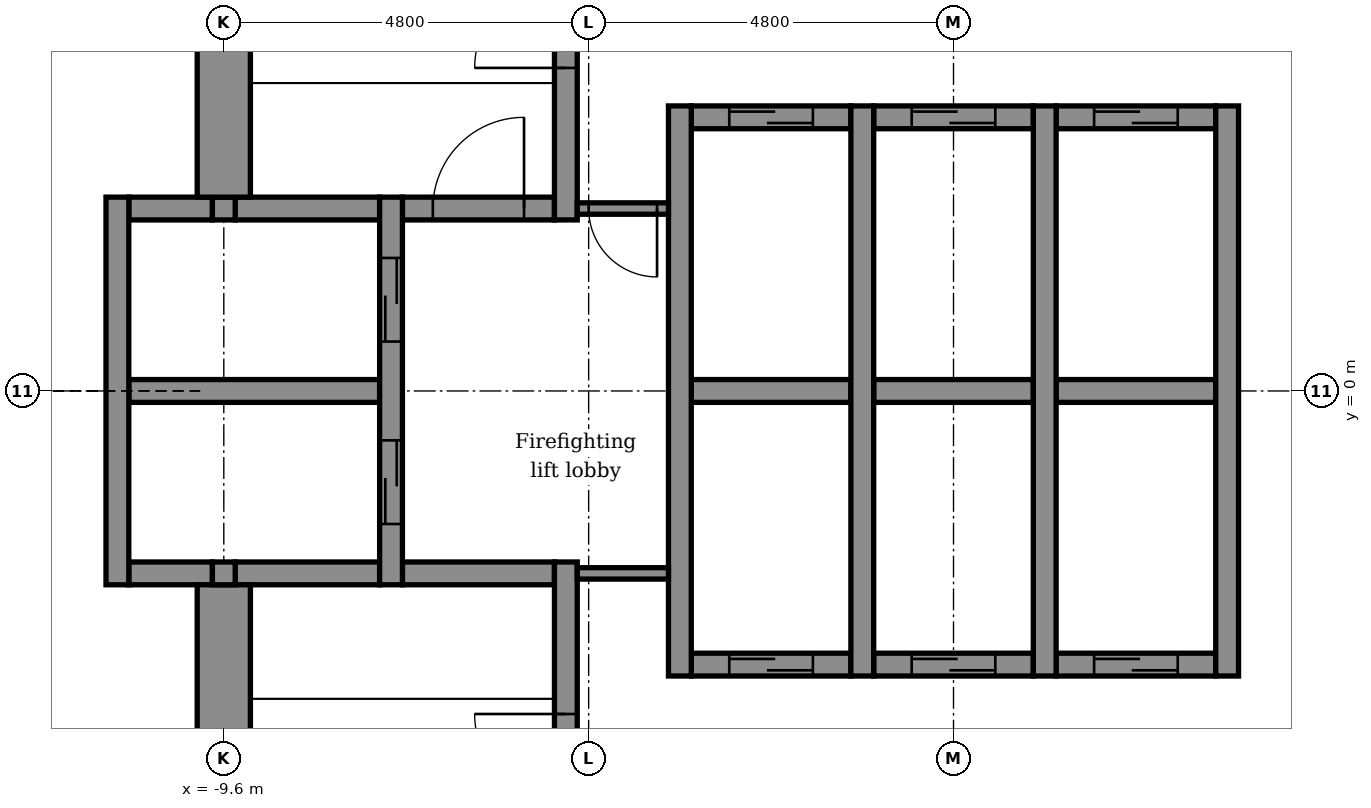
"""IFC4 building model, lengths in metres.
Left out: names, types, materials, properties, quantities, classifications, styles, units other than length and angle.
Written with IfcOpenShell. Run it as: python <this file> out.ifc"""

import sys

from ifc_helpers import new_model, si_unit, direction, frame, frame_2d, origin, place, context, subcontext, project, spatial, rectangle, extrude, element, fill, save


model = new_model("IFC4")
c1 = context("Model", 3, precision=1e-05, world=origin(), true_north=direction((0.0, 1.0)))
c2 = subcontext(c1, "Body", "Model", "MODEL_VIEW")
j1 = project(units=[si_unit("LENGTHUNIT", "METRE"), si_unit("PLANEANGLEUNIT", "RADIAN")], contexts=[c1])
p1 = place(None, origin())
s1 = spatial("IfcSite", under=j1, at=p1, CompositionType="ELEMENT")
p2 = place(p1, origin())
s2 = spatial("IfcBuilding", under=s1, at=p2, CompositionType="ELEMENT")
p3 = place(p2, frame((0.0, 0.0, 201.2)))
s3 = spatial("IfcBuildingStorey", under=s2, at=p3, CompositionType="ELEMENT", Elevation=201.2)
p4 = place(p3, frame((-3.45, -3.6, -0.15), z_axis=(0.0, 0.0, 1.0), x_axis=(1.0, 0.0, 0.0)))
e1 = element("IfcWall", 1, at=p4, inside=s3, PredefinedType="STANDARD", context=c2, shape_type="SweptSolid", body=[
    extrude(rectangle(XDim=2.1, YDim=0.3, at=frame_2d((1.05, 0.0))), origin(), (0.0, 0.0, 1.0), 3.9),
])
p5 = place(p4, frame((0.5, 0.0, 0.15)))
e2 = element("IfcOpeningElement", 2, at=p5, cuts=e1, PredefinedType="OPENING", context=c2, shape_type="SweptSolid", body=[
    extrude(rectangle(XDim=1.1, YDim=2.1, at=frame_2d((0.55, 1.05))), frame((0.0, 0.16, 0.0), z_axis=(0.0, -1.0, 0.0), x_axis=(1.0, 0.0, 0.0)), (0.0, 0.0, 1.0), 0.32),
])
p6 = place(p3, frame((-1.05, -3.6, -0.15), z_axis=(0.0, 0.0, 1.0), x_axis=(1.0, 0.0, 0.0)))
e3 = element("IfcWall", 3, at=p6, inside=s3, PredefinedType="STANDARD", context=c2, shape_type="SweptSolid", body=[
    extrude(rectangle(XDim=2.1, YDim=0.3, at=frame_2d((1.05, 0.0))), origin(), (0.0, 0.0, 1.0), 3.9),
])
p7 = place(p6, frame((0.5, 0.0, 0.15)))
e4 = element("IfcOpeningElement", 4, at=p7, cuts=e3, PredefinedType="OPENING", context=c2, shape_type="SweptSolid", body=[
    extrude(rectangle(XDim=1.1, YDim=2.1, at=frame_2d((0.55, 1.05))), frame((0.0, 0.16, 0.0), z_axis=(0.0, -1.0, 0.0), x_axis=(1.0, 0.0, 0.0)), (0.0, 0.0, 1.0), 0.32),
])
p8 = place(p3, frame((1.35, -3.6, -0.15), z_axis=(0.0, 0.0, 1.0), x_axis=(1.0, 0.0, 0.0)))
e5 = element("IfcWall", 5, at=p8, inside=s3, PredefinedType="STANDARD", context=c2, shape_type="SweptSolid", body=[
    extrude(rectangle(XDim=2.1, YDim=0.3, at=frame_2d((1.05, 0.0))), origin(), (0.0, 0.0, 1.0), 3.9),
])
p9 = place(p8, frame((0.5, 0.0, 0.15)))
e6 = element("IfcOpeningElement", 6, at=p9, cuts=e5, PredefinedType="OPENING", context=c2, shape_type="SweptSolid", body=[
    extrude(rectangle(XDim=1.1, YDim=2.1, at=frame_2d((0.55, 1.05))), frame((0.0, 0.16, 0.0), z_axis=(0.0, -1.0, 0.0), x_axis=(1.0, 0.0, 0.0)), (0.0, 0.0, 1.0), 0.32),
])
p10 = place(p3, frame((-10.85, -2.4, -0.15), z_axis=(0.0, 0.0, 1.0), x_axis=(1.0, 0.0, 0.0)))
e7 = element("IfcWall", 7, at=p10, inside=s3, PredefinedType="STANDARD", context=c2, shape_type="SweptSolid", body=[
    extrude(rectangle(XDim=1.1, YDim=0.3, at=frame_2d((0.55, 0.0))), origin(), (0.0, 0.0, 1.0), 3.9),
])
p11 = place(p3, frame((-9.45, -2.4, -0.15), z_axis=(0.0, 0.0, 1.0), x_axis=(1.0, 0.0, 0.0)))
e8 = element("IfcWall", 8, at=p11, inside=s3, PredefinedType="STANDARD", context=c2, shape_type="SweptSolid", body=[
    extrude(rectangle(XDim=1.9, YDim=0.3, at=frame_2d((0.95, 0.0))), origin(), (0.0, 0.0, 1.0), 3.9),
])
p12 = place(p3, frame((-7.25, -2.4, -0.15), z_axis=(0.0, 0.0, 1.0), x_axis=(1.0, 0.0, 0.0)))
e9 = element("IfcWall", 9, at=p12, inside=s3, PredefinedType="STANDARD", context=c2, shape_type="SweptSolid", body=[
    extrude(rectangle(XDim=2.0, YDim=0.3, at=frame_2d((1.0, 0.0))), origin(), (0.0, 0.0, 1.0), 3.9),
])
p13 = place(p3, frame((-10.85, 0.0, -0.15), z_axis=(0.0, 0.0, 1.0), x_axis=(1.0, 0.0, 0.0)))
e10 = element("IfcWall", 10, at=p13, inside=s3, PredefinedType="STANDARD", context=c2, shape_type="SweptSolid", body=[
    extrude(rectangle(XDim=3.3, YDim=0.3, at=frame_2d((1.65, 0.0))), origin(), (0.0, 0.0, 1.0), 3.9),
])
p14 = place(p3, frame((-3.45, 0.0, -0.15), z_axis=(0.0, 0.0, 1.0), x_axis=(1.0, 0.0, 0.0)))
e11 = element("IfcWall", 11, at=p14, inside=s3, PredefinedType="STANDARD", context=c2, shape_type="SweptSolid", body=[
    extrude(rectangle(XDim=2.1, YDim=0.3, at=frame_2d((1.05, 0.0))), origin(), (0.0, 0.0, 1.0), 3.9),
])
p15 = place(p3, frame((-1.05, 0.0, -0.15), z_axis=(0.0, 0.0, 1.0), x_axis=(1.0, 0.0, 0.0)))
e12 = element("IfcWall", 12, at=p15, inside=s3, PredefinedType="STANDARD", context=c2, shape_type="SweptSolid", body=[
    extrude(rectangle(XDim=2.1, YDim=0.3, at=frame_2d((1.05, 0.0))), origin(), (0.0, 0.0, 1.0), 3.9),
])
p16 = place(p3, frame((1.35, 0.0, -0.15), z_axis=(0.0, 0.0, 1.0), x_axis=(1.0, 0.0, 0.0)))
e13 = element("IfcWall", 13, at=p16, inside=s3, PredefinedType="STANDARD", context=c2, shape_type="SweptSolid", body=[
    extrude(rectangle(XDim=2.1, YDim=0.3, at=frame_2d((1.05, 0.0))), origin(), (0.0, 0.0, 1.0), 3.9),
])
p17 = place(p3, frame((-10.85, 2.4, -0.15), z_axis=(0.0, 0.0, 1.0), x_axis=(1.0, 0.0, 0.0)))
e14 = element("IfcWall", 14, at=p17, inside=s3, PredefinedType="STANDARD", context=c2, shape_type="SweptSolid", body=[
    extrude(rectangle(XDim=1.1, YDim=0.3, at=frame_2d((0.55, 0.0))), origin(), (0.0, 0.0, 1.0), 3.9),
])
p18 = place(p3, frame((-9.45, 2.4, -0.15), z_axis=(0.0, 0.0, 1.0), x_axis=(1.0, 0.0, 0.0)))
e15 = element("IfcWall", 15, at=p18, inside=s3, PredefinedType="STANDARD", context=c2, shape_type="SweptSolid", body=[
    extrude(rectangle(XDim=1.9, YDim=0.3, at=frame_2d((0.95, 0.0))), origin(), (0.0, 0.0, 1.0), 3.9),
])
p19 = place(p3, frame((-7.25, 2.4, -0.15), z_axis=(0.0, 0.0, 1.0), x_axis=(1.0, 0.0, 0.0)))
e16 = element("IfcWall", 16, at=p19, inside=s3, PredefinedType="STANDARD", context=c2, shape_type="SweptSolid", body=[
    extrude(rectangle(XDim=2.0, YDim=0.3, at=frame_2d((1.0, 0.0))), origin(), (0.0, 0.0, 1.0), 3.9),
])
p20 = place(p19, frame((0.4, 0.0, 0.15)))
e17 = element("IfcOpeningElement", 17, at=p20, cuts=e16, PredefinedType="OPENING", context=c2, shape_type="SweptSolid", body=[
    extrude(rectangle(XDim=1.2, YDim=2.1, at=frame_2d((0.6, 1.05))), frame((0.0, 0.16, 0.0), z_axis=(0.0, -1.0, 0.0), x_axis=(1.0, 0.0, 0.0)), (0.0, 0.0, 1.0), 0.32),
])
p21 = place(p3, frame((-3.45, 3.6, -0.15), z_axis=(0.0, 0.0, 1.0), x_axis=(1.0, 0.0, 0.0)))
e18 = element("IfcWall", 18, at=p21, inside=s3, PredefinedType="STANDARD", context=c2, shape_type="SweptSolid", body=[
    extrude(rectangle(XDim=2.1, YDim=0.3, at=frame_2d((1.05, 0.0))), origin(), (0.0, 0.0, 1.0), 3.9),
])
p22 = place(p21, frame((0.5, 0.0, 0.15)))
e19 = element("IfcOpeningElement", 19, at=p22, cuts=e18, PredefinedType="OPENING", context=c2, shape_type="SweptSolid", body=[
    extrude(rectangle(XDim=1.1, YDim=2.1, at=frame_2d((0.55, 1.05))), frame((0.0, 0.16, 0.0), z_axis=(0.0, -1.0, 0.0), x_axis=(1.0, 0.0, 0.0)), (0.0, 0.0, 1.0), 0.32),
])
p23 = place(p3, frame((-1.05, 3.6, -0.15), z_axis=(0.0, 0.0, 1.0), x_axis=(1.0, 0.0, 0.0)))
e20 = element("IfcWall", 20, at=p23, inside=s3, PredefinedType="STANDARD", context=c2, shape_type="SweptSolid", body=[
    extrude(rectangle(XDim=2.1, YDim=0.3, at=frame_2d((1.05, 0.0))), origin(), (0.0, 0.0, 1.0), 3.9),
])
p24 = place(p23, frame((0.5, 0.0, 0.15)))
e21 = element("IfcOpeningElement", 21, at=p24, cuts=e20, PredefinedType="OPENING", context=c2, shape_type="SweptSolid", body=[
    extrude(rectangle(XDim=1.1, YDim=2.1, at=frame_2d((0.55, 1.05))), frame((0.0, 0.16, 0.0), z_axis=(0.0, -1.0, 0.0), x_axis=(1.0, 0.0, 0.0)), (0.0, 0.0, 1.0), 0.32),
])
p25 = place(p3, frame((1.35, 3.6, -0.15), z_axis=(0.0, 0.0, 1.0), x_axis=(1.0, 0.0, 0.0)))
e22 = element("IfcWall", 22, at=p25, inside=s3, PredefinedType="STANDARD", context=c2, shape_type="SweptSolid", body=[
    extrude(rectangle(XDim=2.1, YDim=0.3, at=frame_2d((1.05, 0.0))), origin(), (0.0, 0.0, 1.0), 3.9),
])
p26 = place(p25, frame((0.5, 0.0, 0.15)))
e23 = element("IfcOpeningElement", 23, at=p26, cuts=e22, PredefinedType="OPENING", context=c2, shape_type="SweptSolid", body=[
    extrude(rectangle(XDim=1.1, YDim=2.1, at=frame_2d((0.55, 1.05))), frame((0.0, 0.16, 0.0), z_axis=(0.0, -1.0, 0.0), x_axis=(1.0, 0.0, 0.0)), (0.0, 0.0, 1.0), 0.32),
])
p27 = place(p3, frame((-11.0, -2.55, -0.15), z_axis=(0.0, 0.0, 1.0), x_axis=(0.0, 1.0, 0.0)))
e24 = element("IfcWall", 24, at=p27, inside=s3, PredefinedType="STANDARD", context=c2, shape_type="SweptSolid", body=[
    extrude(rectangle(XDim=5.1, YDim=0.3, at=frame_2d((2.55, 0.0))), origin(), (0.0, 0.0, 1.0), 3.9),
])
p28 = place(p3, frame((-9.6, -10.15, -0.15), z_axis=(0.0, 0.0, 1.0), x_axis=(0.0, 1.0, 0.0)))
e25 = element("IfcWall", 25, at=p28, inside=s3, PredefinedType="SHEAR", context=c2, shape_type="SweptSolid", body=[
    extrude(rectangle(XDim=7.6, YDim=0.7, at=frame_2d((3.8, 0.0))), origin(), (0.0, 0.0, 1.0), 3.9),
])
for number, where, z_axis, x_axis in (
    (26, (-9.6, -2.55, -0.15), (0.0, 0.0, 1.0), (0.0, 1.0, 0.0)),
    (27, (-9.6, 2.25, -0.15), (0.0, 0.0, 1.0), (0.0, 1.0, 0.0)),
):
    element("IfcWall", number, at=place(p3, frame(where, z_axis=z_axis, x_axis=x_axis)), inside=s3, PredefinedType="STANDARD", context=c2, shape_type="SweptSolid", body=[
        extrude(rectangle(XDim=0.3, YDim=0.3, at=frame_2d((0.15, 0.0))), origin(), (0.0, 0.0, 1.0), 3.9),
    ])
p29 = place(p3, frame((-9.6, 2.55, -0.15), z_axis=(0.0, 0.0, 1.0), x_axis=(0.0, 1.0, 0.0)))
e28 = element("IfcWall", 28, at=p29, inside=s3, PredefinedType="SHEAR", context=c2, shape_type="SweptSolid", body=[
    extrude(rectangle(XDim=7.6, YDim=0.7, at=frame_2d((3.8, 0.0))), origin(), (0.0, 0.0, 1.0), 3.9),
])
p30 = place(p3, frame((-7.4, -2.55, -0.15), z_axis=(0.0, 0.0, 1.0), x_axis=(0.0, 1.0, 0.0)))
e29 = element("IfcWall", 29, at=p30, inside=s3, PredefinedType="STANDARD", context=c2, shape_type="SweptSolid", body=[
    extrude(rectangle(XDim=5.1, YDim=0.3, at=frame_2d((2.55, 0.0))), origin(), (0.0, 0.0, 1.0), 3.9),
])
p31 = place(p30, frame((0.8, 0.0, 0.15)))
e30 = element("IfcOpeningElement", 30, at=p31, cuts=e29, PredefinedType="OPENING", context=c2, shape_type="SweptSolid", body=[
    extrude(rectangle(XDim=1.1, YDim=2.1, at=frame_2d((0.55, 1.05))), frame((0.0, 0.16, 0.0), z_axis=(0.0, -1.0, 0.0), x_axis=(1.0, 0.0, 0.0)), (0.0, 0.0, 1.0), 0.32),
])
p32 = place(p30, frame((3.2, 0.0, 0.15)))
e31 = element("IfcOpeningElement", 31, at=p32, cuts=e29, PredefinedType="OPENING", context=c2, shape_type="SweptSolid", body=[
    extrude(rectangle(XDim=1.1, YDim=2.1, at=frame_2d((0.55, 1.05))), frame((0.0, 0.16, 0.0), z_axis=(0.0, -1.0, 0.0), x_axis=(1.0, 0.0, 0.0)), (0.0, 0.0, 1.0), 0.32),
])
p33 = place(p3, frame((-5.1, -9.25, -0.15), z_axis=(0.0, 0.0, 1.0), x_axis=(0.0, 1.0, 0.0)))
e32 = element("IfcWall", 32, at=p33, inside=s3, PredefinedType="STANDARD", context=c2, shape_type="SweptSolid", body=[
    extrude(rectangle(XDim=7.0, YDim=0.3, at=frame_2d((3.5, 0.0))), origin(), (0.0, 0.0, 1.0), 3.9),
])
p34 = place(p33, frame((3.8, 0.0, 0.15)))
e33 = element("IfcOpeningElement", 33, at=p34, cuts=e32, PredefinedType="OPENING", context=c2, shape_type="SweptSolid", body=[
    extrude(rectangle(XDim=1.2, YDim=2.1, at=frame_2d((0.6, 1.05))), frame((0.0, 0.16, 0.0), z_axis=(0.0, -1.0, 0.0), x_axis=(1.0, 0.0, 0.0)), (0.0, 0.0, 1.0), 0.32),
])
p35 = place(p3, frame((-5.1, 2.25, -0.15), z_axis=(0.0, 0.0, 1.0), x_axis=(0.0, 1.0, 0.0)))
e34 = element("IfcWall", 34, at=p35, inside=s3, PredefinedType="STANDARD", context=c2, shape_type="SweptSolid", body=[
    extrude(rectangle(XDim=7.0, YDim=0.3, at=frame_2d((3.5, 0.0))), origin(), (0.0, 0.0, 1.0), 3.9),
])
p36 = place(p35, frame((2.0, 0.0, 0.15)))
e35 = element("IfcOpeningElement", 35, at=p36, cuts=e34, PredefinedType="OPENING", context=c2, shape_type="SweptSolid", body=[
    extrude(rectangle(XDim=1.2, YDim=2.1, at=frame_2d((0.6, 1.05))), frame((0.0, 0.16, 0.0), z_axis=(0.0, -1.0, 0.0), x_axis=(1.0, 0.0, 0.0)), (0.0, 0.0, 1.0), 0.32),
])
for number, where, z_axis, x_axis in (
    (36, (-3.6, -3.75, -0.15), (0.0, 0.0, 1.0), (0.0, 1.0, 0.0)),
    (37, (-1.2, -3.75, -0.15), (0.0, 0.0, 1.0), (0.0, 1.0, 0.0)),
    (38, (1.2, -3.75, -0.15), (0.0, 0.0, 1.0), (0.0, 1.0, 0.0)),
    (39, (3.6, -3.75, -0.15), (0.0, 0.0, 1.0), (0.0, 1.0, 0.0)),
):
    element("IfcWall", number, at=place(p3, frame(where, z_axis=z_axis, x_axis=x_axis)), inside=s3, PredefinedType="STANDARD", context=c2, shape_type="SweptSolid", body=[
        extrude(rectangle(XDim=7.5, YDim=0.3, at=frame_2d((3.75, 0.0))), origin(), (0.0, 0.0, 1.0), 3.9),
    ])
p37 = place(p3, frame((-4.95, 2.4, 0.0), z_axis=(0.0, 0.0, 1.0), x_axis=(1.0, 0.0, 0.0)))
e40 = element("IfcWall", 40, at=p37, inside=s3, PredefinedType="PARTITIONING", context=c2, shape_type="SweptSolid", body=[
    extrude(rectangle(XDim=1.2, YDim=0.15, at=frame_2d((0.6, 0.0))), origin(), (0.0, 0.0, 1.0), 3.75),
])
p38 = place(p37, frame((0.15, 0.0, 0.0)))
e41 = element("IfcOpeningElement", 41, at=p38, cuts=e40, PredefinedType="OPENING", context=c2, shape_type="SweptSolid", body=[
    extrude(rectangle(XDim=0.9, YDim=2.1, at=frame_2d((0.45, 1.05))), frame((0.0, 0.085, 0.0), z_axis=(0.0, -1.0, 0.0), x_axis=(1.0, 0.0, 0.0)), (0.0, 0.0, 1.0), 0.17),
])
p39 = place(p3, frame((-4.95, -2.4, 0.0), z_axis=(0.0, 0.0, 1.0), x_axis=(1.0, 0.0, 0.0)))
e42 = element("IfcWall", 42, at=p39, inside=s3, PredefinedType="PARTITIONING", context=c2, shape_type="SweptSolid", body=[
    extrude(rectangle(XDim=1.2, YDim=0.15, at=frame_2d((0.6, 0.0))), origin(), (0.0, 0.0, 1.0), 3.75),
])
p40 = place(p31, origin())
e43 = element("IfcDoor", 43, at=p40, inside=s3, OperationType="DOUBLE_DOOR_SLIDING", PredefinedType="DOOR", context=c2, shape_type="SweptSolid", body=[
    extrude(rectangle(XDim=1.1, YDim=2.1, at=frame_2d((0.55, 1.05))), frame((0.0, 0.025, 0.0), z_axis=(0.0, -1.0, 0.0), x_axis=(1.0, 0.0, 0.0)), (0.0, 0.0, 1.0), 0.05),
])
fill(e30, e43)
p41 = place(p32, origin())
e44 = element("IfcDoor", 44, at=p41, inside=s3, OperationType="DOUBLE_DOOR_SLIDING", PredefinedType="DOOR", context=c2, shape_type="SweptSolid", body=[
    extrude(rectangle(XDim=1.1, YDim=2.1, at=frame_2d((0.55, 1.05))), frame((0.0, 0.025, 0.0), z_axis=(0.0, -1.0, 0.0), x_axis=(1.0, 0.0, 0.0)), (0.0, 0.0, 1.0), 0.05),
])
fill(e31, e44)
p42 = place(p22, origin())
e45 = element("IfcDoor", 45, at=p42, inside=s3, OperationType="DOUBLE_DOOR_SLIDING", PredefinedType="DOOR", context=c2, shape_type="SweptSolid", body=[
    extrude(rectangle(XDim=1.1, YDim=2.1, at=frame_2d((0.55, 1.05))), frame((0.0, 0.025, 0.0), z_axis=(0.0, -1.0, 0.0), x_axis=(1.0, 0.0, 0.0)), (0.0, 0.0, 1.0), 0.05),
])
fill(e19, e45)
p43 = place(p24, origin())
e46 = element("IfcDoor", 46, at=p43, inside=s3, OperationType="DOUBLE_DOOR_SLIDING", PredefinedType="DOOR", context=c2, shape_type="SweptSolid", body=[
    extrude(rectangle(XDim=1.1, YDim=2.1, at=frame_2d((0.55, 1.05))), frame((0.0, 0.025, 0.0), z_axis=(0.0, -1.0, 0.0), x_axis=(1.0, 0.0, 0.0)), (0.0, 0.0, 1.0), 0.05),
])
fill(e21, e46)
p44 = place(p26, origin())
e47 = element("IfcDoor", 47, at=p44, inside=s3, OperationType="DOUBLE_DOOR_SLIDING", PredefinedType="DOOR", context=c2, shape_type="SweptSolid", body=[
    extrude(rectangle(XDim=1.1, YDim=2.1, at=frame_2d((0.55, 1.05))), frame((0.0, 0.025, 0.0), z_axis=(0.0, -1.0, 0.0), x_axis=(1.0, 0.0, 0.0)), (0.0, 0.0, 1.0), 0.05),
])
fill(e23, e47)
p45 = place(p5, origin())
e48 = element("IfcDoor", 48, at=p45, inside=s3, OperationType="DOUBLE_DOOR_SLIDING", PredefinedType="DOOR", context=c2, shape_type="SweptSolid", body=[
    extrude(rectangle(XDim=1.1, YDim=2.1, at=frame_2d((0.55, 1.05))), frame((0.0, 0.025, 0.0), z_axis=(0.0, -1.0, 0.0), x_axis=(1.0, 0.0, 0.0)), (0.0, 0.0, 1.0), 0.05),
])
fill(e2, e48)
p46 = place(p7, origin())
e49 = element("IfcDoor", 49, at=p46, inside=s3, OperationType="DOUBLE_DOOR_SLIDING", PredefinedType="DOOR", context=c2, shape_type="SweptSolid", body=[
    extrude(rectangle(XDim=1.1, YDim=2.1, at=frame_2d((0.55, 1.05))), frame((0.0, 0.025, 0.0), z_axis=(0.0, -1.0, 0.0), x_axis=(1.0, 0.0, 0.0)), (0.0, 0.0, 1.0), 0.05),
])
fill(e4, e49)
p47 = place(p9, origin())
e50 = element("IfcDoor", 50, at=p47, inside=s3, OperationType="DOUBLE_DOOR_SLIDING", PredefinedType="DOOR", context=c2, shape_type="SweptSolid", body=[
    extrude(rectangle(XDim=1.1, YDim=2.1, at=frame_2d((0.55, 1.05))), frame((0.0, 0.025, 0.0), z_axis=(0.0, -1.0, 0.0), x_axis=(1.0, 0.0, 0.0)), (0.0, 0.0, 1.0), 0.05),
])
fill(e6, e50)
p48 = place(p36, origin())
e51 = element("IfcDoor", 51, at=p48, inside=s3, OperationType="SINGLE_SWING_LEFT", PredefinedType="DOOR", context=c2, shape_type="SweptSolid", body=[
    extrude(rectangle(XDim=1.2, YDim=2.1, at=frame_2d((0.6, 1.05))), frame((0.0, 0.025, 0.0), z_axis=(0.0, -1.0, 0.0), x_axis=(1.0, 0.0, 0.0)), (0.0, 0.0, 1.0), 0.05),
])
fill(e35, e51)
p49 = place(p34, origin())
e52 = element("IfcDoor", 52, at=p49, inside=s3, OperationType="SINGLE_SWING_RIGHT", PredefinedType="DOOR", context=c2, shape_type="SweptSolid", body=[
    extrude(rectangle(XDim=1.2, YDim=2.1, at=frame_2d((0.6, 1.05))), frame((0.0, 0.025, 0.0), z_axis=(0.0, -1.0, 0.0), x_axis=(1.0, 0.0, 0.0)), (0.0, 0.0, 1.0), 0.05),
])
fill(e33, e52)
p50 = place(p38, frame((0.9, 0.0, 0.0), z_axis=(0.0, 0.0, 1.0), x_axis=(-1.0, 0.0, 0.0)))
e53 = element("IfcDoor", 53, at=p50, inside=s3, OperationType="SINGLE_SWING_RIGHT", PredefinedType="DOOR", context=c2, shape_type="SweptSolid", body=[
    extrude(rectangle(XDim=0.9, YDim=2.1, at=frame_2d((0.45, 1.05))), frame((0.0, 0.025, 0.0), z_axis=(0.0, -1.0, 0.0), x_axis=(1.0, 0.0, 0.0)), (0.0, 0.0, 1.0), 0.05),
])
fill(e41, e53)
p51 = place(p20, origin())
e54 = element("IfcDoor", 54, at=p51, inside=s3, OperationType="SINGLE_SWING_RIGHT", PredefinedType="DOOR", context=c2, shape_type="SweptSolid", body=[
    extrude(rectangle(XDim=1.2, YDim=2.1, at=frame_2d((0.6, 1.05))), frame((0.0, 0.025, 0.0), z_axis=(0.0, -1.0, 0.0), x_axis=(1.0, 0.0, 0.0)), (0.0, 0.0, 1.0), 0.05),
])
fill(e17, e54)
save(model, sys.argv[1])
